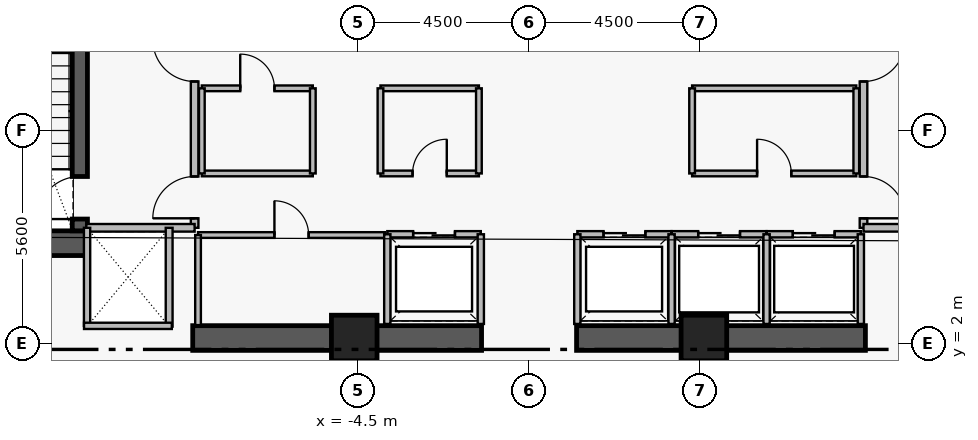
"""IFC4 building model, lengths in metres.
Left out: names, types, materials, properties, quantities, classifications, styles, units other than length and angle.
Written with IfcOpenShell. Run it as: python <this file> out.ifc"""

import sys

from ifc_helpers import new_model, si_unit, direction, frame, frame_2d, origin, origin_2d, place, context, subcontext, project, spatial, rectangle, extrude, element, fill, save


model = new_model("IFC4")
c1 = context("Model", 3, precision=1e-05, world=origin(), true_north=direction((0.0, 1.0)))
c2 = subcontext(c1, "Body", "Model", "MODEL_VIEW")
j1 = project(units=[si_unit("LENGTHUNIT", "METRE"), si_unit("PLANEANGLEUNIT", "RADIAN")], contexts=[c1])
p1 = place(None, origin())
s1 = spatial("IfcSite", under=j1, at=p1, CompositionType="ELEMENT")
p2 = place(p1, origin())
s2 = spatial("IfcBuilding", under=s1, at=p2, CompositionType="ELEMENT")
p3 = place(p2, frame((0.0, 0.0, 226.15)))
s3 = spatial("IfcBuildingStorey", under=s2, at=p3, CompositionType="ELEMENT", Elevation=226.15)
p4 = place(p3, frame((-16.06, 4.645, 0.0), z_axis=(0.0, 0.0, 1.0), x_axis=(1.0, 0.0, 0.0)))
e1 = element("IfcWall", 1, at=p4, inside=s3, PredefinedType="SHEAR", context=c2, shape_type="SweptSolid", body=[
    extrude(rectangle(XDim=4.46, YDim=0.65, at=frame_2d((2.23, 0.0))), origin(), (0.0, 0.0, 1.0), 3.56),
])
for number, where, z_axis, x_axis in (
    (2, (-8.85, 2.15, 0.0), (0.0, 0.0, 1.0), (1.0, 0.0, 0.0)),
    (3, (1.25, 2.15, 0.0), (0.0, 0.0, 1.0), (1.0, 0.0, 0.0)),
):
    element("IfcWall", number, at=place(p3, frame(where, z_axis=z_axis, x_axis=x_axis)), inside=s3, PredefinedType="SHEAR", context=c2, shape_type="SweptSolid", body=[
        extrude(rectangle(XDim=7.6, YDim=0.65, at=frame_2d((3.8, 0.0))), origin(), (0.0, 0.0, 1.0), 3.53),
    ])
p5 = place(p3, frame((-11.82, 4.97, 0.0), z_axis=(0.0, 0.0, 1.0), x_axis=(0.0, 1.0, 0.0)))
e4 = element("IfcWall", 4, at=p5, inside=s3, PredefinedType="SHEAR", context=c2, shape_type="SweptSolid", body=[
    extrude(rectangle(XDim=8.96, YDim=0.4, at=frame_2d((4.48, 0.0))), origin(), (0.0, 0.0, 1.0), 3.56),
])
p6 = place(p5, frame((0.31, 0.0, 0.0)))
e5 = element("IfcOpeningElement", 5, at=p6, cuts=e4, PredefinedType="OPENING", context=c2, shape_type="SweptSolid", body=[
    extrude(rectangle(XDim=1.12, YDim=2.22, at=frame_2d((0.56, 1.11))), frame((0.0, 0.21, 0.0), z_axis=(0.0, -1.0, 0.0), x_axis=(1.0, 0.0, 0.0)), (0.0, 0.0, 1.0), 0.42),
])
for number, where, z_axis, x_axis in (
    (6, (-4.6, 2.15, 0.0), (0.0, 0.0, 1.0), (1.0, 0.0, 0.0)),
    (7, (4.6, 2.15, 0.0), (0.0, 0.0, 1.0), (1.0, 0.0, 0.0)),
):
    element("IfcColumn", number, at=place(p3, frame(where, z_axis=z_axis, x_axis=x_axis)), inside=s3, PredefinedType="COLUMN", context=c2, shape_type="SweptSolid", body=[
        extrude(rectangle(XDim=1.2, YDim=1.2, at=origin_2d()), origin(), (0.0, 0.0, 1.0), 3.75),
    ])
p7 = place(p3, frame((-8.8, 5.05, 0.0), z_axis=(0.0, 0.0, 1.0), x_axis=(0.0, 1.0, 0.0)))
e8 = element("IfcWall", 8, at=p7, inside=s3, PredefinedType="PARTITIONING", context=c2, shape_type="SweptSolid", body=[
    extrude(rectangle(XDim=6.1, YDim=0.2, at=frame_2d((3.05, 0.0))), origin(), (0.0, 0.0, 1.0), 3.53),
])
p8 = place(p7, frame((0.25, 0.0, 0.0)))
e9 = element("IfcOpeningElement", 9, at=p8, cuts=e8, PredefinedType="OPENING", context=c2, shape_type="SweptSolid", body=[
    extrude(rectangle(XDim=1.1, YDim=2.2, at=frame_2d((0.55, 1.1))), frame((0.0, 0.11, 0.0), z_axis=(0.0, -1.0, 0.0), x_axis=(1.0, 0.0, 0.0)), (0.0, 0.0, 1.0), 0.22),
])
p9 = place(p7, frame((3.85, 0.0, 0.0)))
e10 = element("IfcOpeningElement", 10, at=p9, cuts=e8, PredefinedType="OPENING", context=c2, shape_type="SweptSolid", body=[
    extrude(rectangle(XDim=1.1, YDim=2.2, at=frame_2d((0.55, 1.1))), frame((0.0, 0.11, 0.0), z_axis=(0.0, -1.0, 0.0), x_axis=(1.0, 0.0, 0.0)), (0.0, 0.0, 1.0), 0.22),
])
p10 = place(p3, frame((8.8, 11.15, 0.0), z_axis=(0.0, 0.0, 1.0), x_axis=(0.0, -1.0, 0.0)))
e11 = element("IfcWall", 11, at=p10, inside=s3, PredefinedType="PARTITIONING", context=c2, shape_type="SweptSolid", body=[
    extrude(rectangle(XDim=6.1, YDim=0.2, at=frame_2d((3.05, 0.0))), origin(), (0.0, 0.0, 1.0), 3.53),
])
p11 = place(p10, frame((1.15, 0.0, 0.0)))
e12 = element("IfcOpeningElement", 12, at=p11, cuts=e11, PredefinedType="OPENING", context=c2, shape_type="SweptSolid", body=[
    extrude(rectangle(XDim=1.1, YDim=2.2, at=frame_2d((0.55, 1.1))), frame((0.0, 0.11, 0.0), z_axis=(0.0, -1.0, 0.0), x_axis=(1.0, 0.0, 0.0)), (0.0, 0.0, 1.0), 0.22),
])
p12 = place(p10, frame((4.75, 0.0, 0.0)))
e13 = element("IfcOpeningElement", 13, at=p12, cuts=e11, PredefinedType="OPENING", context=c2, shape_type="SweptSolid", body=[
    extrude(rectangle(XDim=1.1, YDim=2.2, at=frame_2d((0.55, 1.1))), frame((0.0, 0.11, 0.0), z_axis=(0.0, -1.0, 0.0), x_axis=(1.0, 0.0, 0.0)), (0.0, 0.0, 1.0), 0.22),
])
p13 = place(p3, frame((-3.73, 4.88, 0.0), z_axis=(0.0, 0.0, 1.0), x_axis=(1.0, 0.0, 0.0)))
e14 = element("IfcWall", 14, at=p13, inside=s3, PredefinedType="PARTITIONING", context=c2, shape_type="SweptSolid", body=[
    extrude(rectangle(XDim=2.46, YDim=0.165, at=frame_2d((1.23, 0.0))), origin(), (0.0, 0.0, 1.0), 3.53),
])
p14 = place(p13, frame((0.68, 0.0, 0.0)))
e15 = element("IfcOpeningElement", 15, at=p14, cuts=e14, PredefinedType="OPENING", context=c2, shape_type="SweptSolid", body=[
    extrude(rectangle(XDim=1.1, YDim=2.25, at=frame_2d((0.55, 1.125))), frame((0.0, 0.093, 0.0), z_axis=(0.0, -1.0, 0.0), x_axis=(1.0, 0.0, 0.0)), (0.0, 0.0, 1.0), 0.185),
])
p15 = place(p3, frame((1.27, 4.88, 0.0), z_axis=(0.0, 0.0, 1.0), x_axis=(1.0, 0.0, 0.0)))
e16 = element("IfcWall", 16, at=p15, inside=s3, PredefinedType="PARTITIONING", context=c2, shape_type="SweptSolid", body=[
    extrude(rectangle(XDim=2.48, YDim=0.165, at=frame_2d((1.24, 0.0))), origin(), (0.0, 0.0, 1.0), 3.53),
])
p16 = place(p15, frame((0.69, 0.0, 0.0)))
e17 = element("IfcOpeningElement", 17, at=p16, cuts=e16, PredefinedType="OPENING", context=c2, shape_type="SweptSolid", body=[
    extrude(rectangle(XDim=1.1, YDim=2.25, at=frame_2d((0.55, 1.125))), frame((0.0, 0.093, 0.0), z_axis=(0.0, -1.0, 0.0), x_axis=(1.0, 0.0, 0.0)), (0.0, 0.0, 1.0), 0.185),
])
p17 = place(p3, frame((3.75, 4.88, 0.0), z_axis=(0.0, 0.0, 1.0), x_axis=(1.0, 0.0, 0.0)))
e18 = element("IfcWall", 18, at=p17, inside=s3, PredefinedType="PARTITIONING", context=c2, shape_type="SweptSolid", body=[
    extrude(rectangle(XDim=2.5, YDim=0.165, at=frame_2d((1.25, 0.0))), origin(), (0.0, 0.0, 1.0), 3.53),
])
p18 = place(p17, frame((0.7, 0.0, 0.0)))
e19 = element("IfcOpeningElement", 19, at=p18, cuts=e18, PredefinedType="OPENING", context=c2, shape_type="SweptSolid", body=[
    extrude(rectangle(XDim=1.1, YDim=2.25, at=frame_2d((0.55, 1.125))), frame((0.0, 0.093, 0.0), z_axis=(0.0, -1.0, 0.0), x_axis=(1.0, 0.0, 0.0)), (0.0, 0.0, 1.0), 0.185),
])
p19 = place(p3, frame((6.25, 4.88, 0.0), z_axis=(0.0, 0.0, 1.0), x_axis=(1.0, 0.0, 0.0)))
e20 = element("IfcWall", 20, at=p19, inside=s3, PredefinedType="PARTITIONING", context=c2, shape_type="SweptSolid", body=[
    extrude(rectangle(XDim=2.48, YDim=0.165, at=frame_2d((1.24, 0.0))), origin(), (0.0, 0.0, 1.0), 3.53),
])
p20 = place(p19, frame((0.69, 0.0, 0.0)))
e21 = element("IfcOpeningElement", 21, at=p20, cuts=e20, PredefinedType="OPENING", context=c2, shape_type="SweptSolid", body=[
    extrude(rectangle(XDim=1.1, YDim=2.25, at=frame_2d((0.55, 1.125))), frame((0.0, 0.093, 0.0), z_axis=(0.0, -1.0, 0.0), x_axis=(1.0, 0.0, 0.0)), (0.0, 0.0, 1.0), 0.185),
])
p21 = place(p3, frame((-8.71, 4.86, 0.0), z_axis=(0.0, 0.0, 1.0), x_axis=(1.0, 0.0, 0.0)))
e22 = element("IfcWall", 22, at=p21, inside=s3, PredefinedType="PARTITIONING", context=c2, shape_type="SweptSolid", body=[
    extrude(rectangle(XDim=4.92, YDim=0.15, at=frame_2d((2.46, 0.0))), origin(), (0.0, 0.0, 1.0), 3.53),
])
p22 = place(p21, frame((2.01, 0.0, 0.0)))
e23 = element("IfcOpeningElement", 23, at=p22, cuts=e22, PredefinedType="OPENING", context=c2, shape_type="SweptSolid", body=[
    extrude(rectangle(XDim=0.9, YDim=2.15, at=frame_2d((0.45, 1.075))), frame((0.0, 0.085, 0.0), z_axis=(0.0, -1.0, 0.0), x_axis=(1.0, 0.0, 0.0)), (0.0, 0.0, 1.0), 0.17),
])
p23 = place(p3, frame((-8.61, 8.72, 0.0), z_axis=(0.0, 0.0, 1.0), x_axis=(1.0, 0.0, 0.0)))
e24 = element("IfcWall", 24, at=p23, inside=s3, PredefinedType="PARTITIONING", context=c2, shape_type="SweptSolid", body=[
    extrude(rectangle(XDim=2.92, YDim=0.15, at=frame_2d((1.46, 0.0))), origin(), (0.0, 0.0, 1.0), 3.53),
])
p24 = place(p23, frame((1.01, 0.0, 0.0)))
e25 = element("IfcOpeningElement", 25, at=p24, cuts=e24, PredefinedType="OPENING", context=c2, shape_type="SweptSolid", body=[
    extrude(rectangle(XDim=0.9, YDim=2.15, at=frame_2d((0.45, 1.075))), frame((0.0, 0.085, 0.0), z_axis=(0.0, -1.0, 0.0), x_axis=(1.0, 0.0, 0.0)), (0.0, 0.0, 1.0), 0.17),
])
p25 = place(p3, frame((-3.91, 6.48, 0.0), z_axis=(0.0, 0.0, 1.0), x_axis=(1.0, 0.0, 0.0)))
e26 = element("IfcWall", 26, at=p25, inside=s3, PredefinedType="PARTITIONING", context=c2, shape_type="SweptSolid", body=[
    extrude(rectangle(XDim=2.59, YDim=0.15, at=frame_2d((1.295, 0.0))), origin(), (0.0, 0.0, 1.0), 3.53),
])
p26 = place(p25, frame((0.845, 0.0, 0.0)))
e27 = element("IfcOpeningElement", 27, at=p26, cuts=e26, PredefinedType="OPENING", context=c2, shape_type="SweptSolid", body=[
    extrude(rectangle(XDim=0.9, YDim=2.15, at=frame_2d((0.45, 1.075))), frame((0.0, 0.085, 0.0), z_axis=(0.0, -1.0, 0.0), x_axis=(1.0, 0.0, 0.0)), (0.0, 0.0, 1.0), 0.17),
])
p27 = place(p3, frame((4.29, 6.48, 0.0), z_axis=(0.0, 0.0, 1.0), x_axis=(1.0, 0.0, 0.0)))
e28 = element("IfcWall", 28, at=p27, inside=s3, PredefinedType="PARTITIONING", context=c2, shape_type="SweptSolid", body=[
    extrude(rectangle(XDim=4.32, YDim=0.15, at=frame_2d((2.16, 0.0))), origin(), (0.0, 0.0, 1.0), 3.53),
])
p28 = place(p27, frame((1.71, 0.0, 0.0)))
e29 = element("IfcOpeningElement", 29, at=p28, cuts=e28, PredefinedType="OPENING", context=c2, shape_type="SweptSolid", body=[
    extrude(rectangle(XDim=0.9, YDim=2.15, at=frame_2d((0.45, 1.075))), frame((0.0, 0.085, 0.0), z_axis=(0.0, -1.0, 0.0), x_axis=(1.0, 0.0, 0.0)), (0.0, 0.0, 1.0), 0.17),
])
for number, where, z_axis, x_axis in (
    (30, (-11.65, 5.05, 0.0), (0.0, 0.0, 1.0), (1.0, 0.0, 0.0)),
    (31, (8.8, 5.05, 0.0), (0.0, 0.0, 1.0), (1.0, 0.0, 0.0)),
):
    element("IfcWall", number, at=place(p3, frame(where, z_axis=z_axis, x_axis=x_axis)), inside=s3, PredefinedType="PARTITIONING", context=c2, shape_type="SweptSolid", body=[
        extrude(rectangle(XDim=2.85, YDim=0.2, at=frame_2d((1.425, 0.0))), origin(), (0.0, 0.0, 1.0), 3.53),
    ])
for number, where, z_axis, x_axis in (
    (32, (-3.73, 2.52, 0.0), (0.0, 0.0, 1.0), (0.0, 1.0, 0.0)),
    (33, (-1.27, 2.52, 0.0), (0.0, 0.0, 1.0), (0.0, 1.0, 0.0)),
    (34, (1.27, 2.52, 0.0), (0.0, 0.0, 1.0), (0.0, 1.0, 0.0)),
    (35, (3.75, 2.52, 0.0), (0.0, 0.0, 1.0), (0.0, 1.0, 0.0)),
    (36, (6.25, 2.52, 0.0), (0.0, 0.0, 1.0), (0.0, 1.0, 0.0)),
    (37, (8.73, 2.52, 0.0), (0.0, 0.0, 1.0), (0.0, 1.0, 0.0)),
):
    element("IfcWall", number, at=place(p3, frame(where, z_axis=z_axis, x_axis=x_axis)), inside=s3, PredefinedType="PARTITIONING", context=c2, shape_type="SweptSolid", body=[
        extrude(rectangle(XDim=2.36, YDim=0.165, at=frame_2d((1.18, 0.0))), origin(), (0.0, 0.0, 1.0), 3.53),
    ])
p29 = place(p3, frame((-8.71, 2.49, 0.0), z_axis=(0.0, 0.0, 1.0), x_axis=(0.0, 1.0, 0.0)))
e38 = element("IfcWall", 38, at=p29, inside=s3, PredefinedType="PARTITIONING", context=c2, shape_type="SweptSolid", body=[
    extrude(rectangle(XDim=2.37, YDim=0.15, at=frame_2d((1.185, 0.0))), origin(), (0.0, 0.0, 1.0), 3.53),
])
p30 = place(p3, frame((-9.47, 2.45, 0.0), z_axis=(0.0, 0.0, 1.0), x_axis=(0.0, 1.0, 0.0)))
e39 = element("IfcWall", 39, at=p30, inside=s3, PredefinedType="PARTITIONING", context=c2, shape_type="SweptSolid", body=[
    extrude(rectangle(XDim=2.6, YDim=0.18, at=frame_2d((1.3, 0.0))), origin(), (0.0, 0.0, 1.0), 3.53),
])
p31 = place(p3, frame((-11.63, 2.47, 0.0), z_axis=(0.0, 0.0, 1.0), x_axis=(0.0, 1.0, 0.0)))
e40 = element("IfcWall", 40, at=p31, inside=s3, PredefinedType="PARTITIONING", context=c2, shape_type="SweptSolid", body=[
    extrude(rectangle(XDim=2.58, YDim=0.165, at=frame_2d((1.29, 0.0))), origin(), (0.0, 0.0, 1.0), 3.53),
])
p32 = place(p3, frame((-11.71, 2.47, 0.0), z_axis=(0.0, 0.0, 1.0), x_axis=(1.0, 0.0, 0.0)))
e41 = element("IfcWall", 41, at=p32, inside=s3, PredefinedType="PARTITIONING", context=c2, shape_type="SweptSolid", body=[
    extrude(rectangle(XDim=2.31, YDim=0.165, at=frame_2d((1.155, 0.0))), origin(), (0.0, 0.0, 1.0), 2.43),
])
p33 = place(p3, frame((-8.61, 6.48, 0.0), z_axis=(0.0, 0.0, 1.0), x_axis=(1.0, 0.0, 0.0)))
e42 = element("IfcWall", 42, at=p33, inside=s3, PredefinedType="PARTITIONING", context=c2, shape_type="SweptSolid", body=[
    extrude(rectangle(XDim=2.92, YDim=0.15, at=frame_2d((1.46, 0.0))), origin(), (0.0, 0.0, 1.0), 3.53),
])
for number, where, z_axis, x_axis in (
    (43, (-8.61, 6.48, 0.0), (0.0, 0.0, 1.0), (0.0, 1.0, 0.0)),
    (44, (-5.69, 6.48, 0.0), (0.0, 0.0, 1.0), (0.0, 1.0, 0.0)),
):
    element("IfcWall", number, at=place(p3, frame(where, z_axis=z_axis, x_axis=x_axis)), inside=s3, PredefinedType="PARTITIONING", context=c2, shape_type="SweptSolid", body=[
        extrude(rectangle(XDim=2.24, YDim=0.15, at=frame_2d((1.12, 0.0))), origin(), (0.0, 0.0, 1.0), 3.53),
    ])
p34 = place(p3, frame((-3.91, 8.72, 0.0), z_axis=(0.0, 0.0, 1.0), x_axis=(1.0, 0.0, 0.0)))
e45 = element("IfcWall", 45, at=p34, inside=s3, PredefinedType="PARTITIONING", context=c2, shape_type="SweptSolid", body=[
    extrude(rectangle(XDim=2.59, YDim=0.15, at=frame_2d((1.295, 0.0))), origin(), (0.0, 0.0, 1.0), 3.53),
])
for number, where, z_axis, x_axis in (
    (46, (-3.91, 6.48, 0.0), (0.0, 0.0, 1.0), (0.0, 1.0, 0.0)),
    (47, (-1.32, 6.48, 0.0), (0.0, 0.0, 1.0), (0.0, 1.0, 0.0)),
):
    element("IfcWall", number, at=place(p3, frame(where, z_axis=z_axis, x_axis=x_axis)), inside=s3, PredefinedType="PARTITIONING", context=c2, shape_type="SweptSolid", body=[
        extrude(rectangle(XDim=2.24, YDim=0.15, at=frame_2d((1.12, 0.0))), origin(), (0.0, 0.0, 1.0), 3.53),
    ])
p35 = place(p3, frame((4.29, 8.72, 0.0), z_axis=(0.0, 0.0, 1.0), x_axis=(1.0, 0.0, 0.0)))
e48 = element("IfcWall", 48, at=p35, inside=s3, PredefinedType="PARTITIONING", context=c2, shape_type="SweptSolid", body=[
    extrude(rectangle(XDim=4.32, YDim=0.15, at=frame_2d((2.16, 0.0))), origin(), (0.0, 0.0, 1.0), 3.53),
])
for number, where, z_axis, x_axis in (
    (49, (4.29, 6.48, 0.0), (0.0, 0.0, 1.0), (0.0, 1.0, 0.0)),
    (50, (8.61, 6.48, 0.0), (0.0, 0.0, 1.0), (0.0, 1.0, 0.0)),
):
    element("IfcWall", number, at=place(p3, frame(where, z_axis=z_axis, x_axis=x_axis)), inside=s3, PredefinedType="PARTITIONING", context=c2, shape_type="SweptSolid", body=[
        extrude(rectangle(XDim=2.24, YDim=0.15, at=frame_2d((1.12, 0.0))), origin(), (0.0, 0.0, 1.0), 3.53),
    ])
p36 = place(p6, origin())
e51 = element("IfcDoor", 51, at=p36, inside=s3, OperationType="SINGLE_SWING_LEFT", PredefinedType="DOOR", context=c2, shape_type="SweptSolid", body=[
    extrude(rectangle(XDim=1.12, YDim=2.22, at=frame_2d((0.56, 1.11))), frame((0.0, 0.025, 0.0), z_axis=(0.0, -1.0, 0.0), x_axis=(1.0, 0.0, 0.0)), (0.0, 0.0, 1.0), 0.05),
])
fill(e5, e51)
p37 = place(p8, origin())
e52 = element("IfcDoor", 52, at=p37, inside=s3, OperationType="SINGLE_SWING_LEFT", PredefinedType="DOOR", context=c2, shape_type="SweptSolid", body=[
    extrude(rectangle(XDim=1.1, YDim=2.2, at=frame_2d((0.55, 1.1))), frame((0.0, 0.025, 0.0), z_axis=(0.0, -1.0, 0.0), x_axis=(1.0, 0.0, 0.0)), (0.0, 0.0, 1.0), 0.05),
])
fill(e9, e52)
p38 = place(p9, origin())
e53 = element("IfcDoor", 53, at=p38, inside=s3, OperationType="SINGLE_SWING_RIGHT", PredefinedType="DOOR", context=c2, shape_type="SweptSolid", body=[
    extrude(rectangle(XDim=1.1, YDim=2.2, at=frame_2d((0.55, 1.1))), frame((0.0, 0.025, 0.0), z_axis=(0.0, -1.0, 0.0), x_axis=(1.0, 0.0, 0.0)), (0.0, 0.0, 1.0), 0.05),
])
fill(e10, e53)
p39 = place(p11, origin())
e54 = element("IfcDoor", 54, at=p39, inside=s3, OperationType="SINGLE_SWING_LEFT", PredefinedType="DOOR", context=c2, shape_type="SweptSolid", body=[
    extrude(rectangle(XDim=1.1, YDim=2.2, at=frame_2d((0.55, 1.1))), frame((0.0, 0.025, 0.0), z_axis=(0.0, -1.0, 0.0), x_axis=(1.0, 0.0, 0.0)), (0.0, 0.0, 1.0), 0.05),
])
fill(e12, e54)
p40 = place(p12, origin())
e55 = element("IfcDoor", 55, at=p40, inside=s3, OperationType="SINGLE_SWING_RIGHT", PredefinedType="DOOR", context=c2, shape_type="SweptSolid", body=[
    extrude(rectangle(XDim=1.1, YDim=2.2, at=frame_2d((0.55, 1.1))), frame((0.0, 0.025, 0.0), z_axis=(0.0, -1.0, 0.0), x_axis=(1.0, 0.0, 0.0)), (0.0, 0.0, 1.0), 0.05),
])
fill(e13, e55)
p41 = place(p14, origin())
e56 = element("IfcDoor", 56, at=p41, inside=s3, OperationType="SLIDING_TO_LEFT", PredefinedType="DOOR", context=c2, shape_type="SweptSolid", body=[
    extrude(rectangle(XDim=1.1, YDim=2.25, at=frame_2d((0.55, 1.125))), frame((0.0, 0.025, 0.0), z_axis=(0.0, -1.0, 0.0), x_axis=(1.0, 0.0, 0.0)), (0.0, 0.0, 1.0), 0.05),
])
fill(e15, e56)
p42 = place(p16, origin())
e57 = element("IfcDoor", 57, at=p42, inside=s3, OperationType="SLIDING_TO_LEFT", PredefinedType="DOOR", context=c2, shape_type="SweptSolid", body=[
    extrude(rectangle(XDim=1.1, YDim=2.25, at=frame_2d((0.55, 1.125))), frame((0.0, 0.025, 0.0), z_axis=(0.0, -1.0, 0.0), x_axis=(1.0, 0.0, 0.0)), (0.0, 0.0, 1.0), 0.05),
])
fill(e17, e57)
p43 = place(p18, origin())
e58 = element("IfcDoor", 58, at=p43, inside=s3, OperationType="SLIDING_TO_LEFT", PredefinedType="DOOR", context=c2, shape_type="SweptSolid", body=[
    extrude(rectangle(XDim=1.1, YDim=2.25, at=frame_2d((0.55, 1.125))), frame((0.0, 0.025, 0.0), z_axis=(0.0, -1.0, 0.0), x_axis=(1.0, 0.0, 0.0)), (0.0, 0.0, 1.0), 0.05),
])
fill(e19, e58)
p44 = place(p20, origin())
e59 = element("IfcDoor", 59, at=p44, inside=s3, OperationType="SLIDING_TO_LEFT", PredefinedType="DOOR", context=c2, shape_type="SweptSolid", body=[
    extrude(rectangle(XDim=1.1, YDim=2.25, at=frame_2d((0.55, 1.125))), frame((0.0, 0.025, 0.0), z_axis=(0.0, -1.0, 0.0), x_axis=(1.0, 0.0, 0.0)), (0.0, 0.0, 1.0), 0.05),
])
fill(e21, e59)
p45 = place(p22, origin())
e60 = element("IfcDoor", 60, at=p45, inside=s3, OperationType="SINGLE_SWING_LEFT", PredefinedType="DOOR", context=c2, shape_type="SweptSolid", body=[
    extrude(rectangle(XDim=0.9, YDim=2.15, at=frame_2d((0.45, 1.075))), frame((0.0, 0.025, 0.0), z_axis=(0.0, -1.0, 0.0), x_axis=(1.0, 0.0, 0.0)), (0.0, 0.0, 1.0), 0.05),
])
fill(e23, e60)
p46 = place(p24, origin())
e61 = element("IfcDoor", 61, at=p46, inside=s3, OperationType="SINGLE_SWING_LEFT", PredefinedType="DOOR", context=c2, shape_type="SweptSolid", body=[
    extrude(rectangle(XDim=0.9, YDim=2.15, at=frame_2d((0.45, 1.075))), frame((0.0, 0.025, 0.0), z_axis=(0.0, -1.0, 0.0), x_axis=(1.0, 0.0, 0.0)), (0.0, 0.0, 1.0), 0.05),
])
fill(e25, e61)
p47 = place(p26, origin())
e62 = element("IfcDoor", 62, at=p47, inside=s3, OperationType="SINGLE_SWING_RIGHT", PredefinedType="DOOR", context=c2, shape_type="SweptSolid", body=[
    extrude(rectangle(XDim=0.9, YDim=2.15, at=frame_2d((0.45, 1.075))), frame((0.0, 0.025, 0.0), z_axis=(0.0, -1.0, 0.0), x_axis=(1.0, 0.0, 0.0)), (0.0, 0.0, 1.0), 0.05),
])
fill(e27, e62)
p48 = place(p28, origin())
e63 = element("IfcDoor", 63, at=p48, inside=s3, OperationType="SINGLE_SWING_LEFT", PredefinedType="DOOR", context=c2, shape_type="SweptSolid", body=[
    extrude(rectangle(XDim=0.9, YDim=2.15, at=frame_2d((0.45, 1.075))), frame((0.0, 0.025, 0.0), z_axis=(0.0, -1.0, 0.0), x_axis=(1.0, 0.0, 0.0)), (0.0, 0.0, 1.0), 0.05),
])
fill(e29, e63)
save(model, sys.argv[1])
